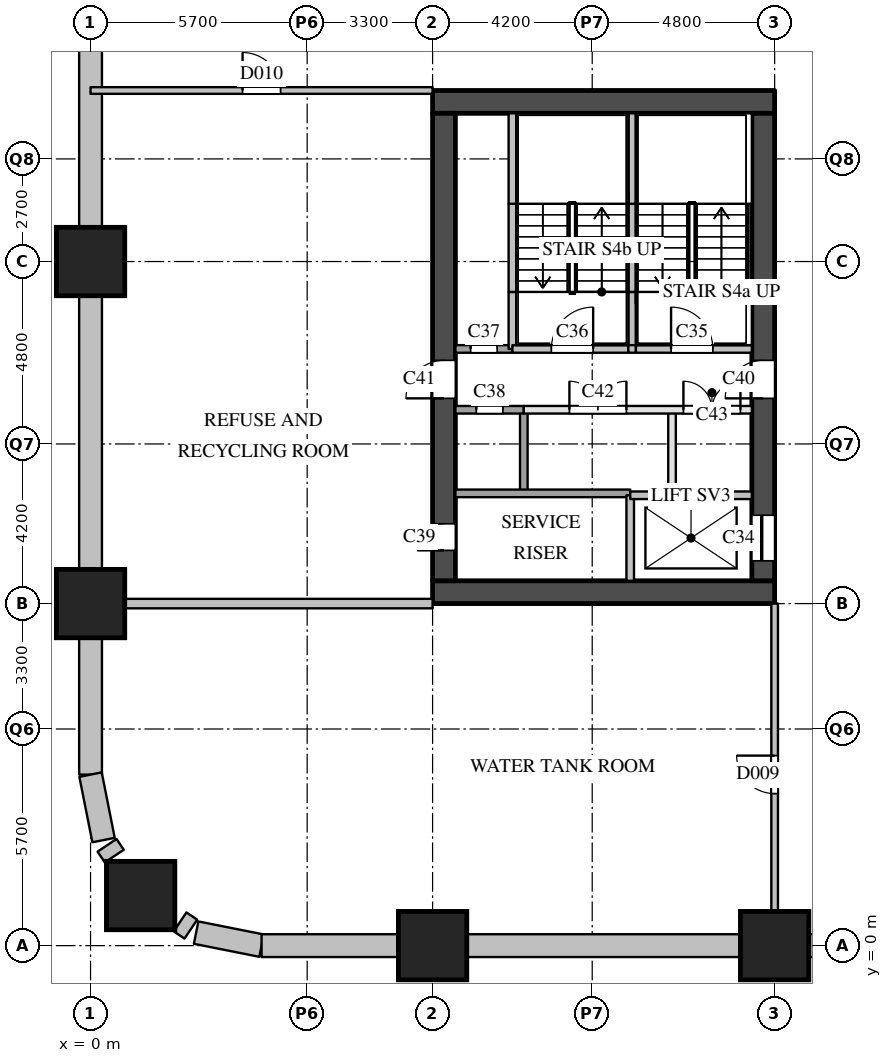
"""IFC4 building model, lengths in metres.
Left out: names, types, materials, properties, quantities, classifications, styles, units other than length and angle.
Written with IfcOpenShell. Run it as: python <this file> out.ifc"""

import sys

from ifc_helpers import new_model, si_unit, direction, frame, frame_2d, origin, origin_2d, place, context, subcontext, project, spatial, rectangle, extrude, element, fill, save


model = new_model("IFC4")
c1 = context("Model", 3, precision=1e-05, world=origin(), true_north=direction((0.0, 1.0)))
c2 = subcontext(c1, "Body", "Model", "MODEL_VIEW")
j1 = project(units=[si_unit("LENGTHUNIT", "METRE"), si_unit("PLANEANGLEUNIT", "RADIAN")], contexts=[c1])
p1 = place(None, origin())
s1 = spatial("IfcSite", under=j1, at=p1, CompositionType="ELEMENT")
p2 = place(p1, origin())
s2 = spatial("IfcBuilding", under=s1, at=p2, CompositionType="ELEMENT")
p3 = place(p2, frame((0.0, 0.0, -6.0)))
s3 = spatial("IfcBuildingStorey", under=s2, at=p3, CompositionType="ELEMENT", Elevation=-6.0)
for number, where, z_axis, x_axis in (
    (1, (1.318, 1.318, 0.0), (0.0, 0.0, 1.0), (1.0, 0.0, 0.0)),
    (2, (0.0, 9.0, 0.0), (0.0, 0.0, 1.0), (1.0, 0.0, 0.0)),
    (3, (0.0, 18.0, 0.0), (0.0, 0.0, 1.0), (1.0, 0.0, 0.0)),
    (4, (9.0, 0.0, 0.0), (0.0, 0.0, 1.0), (1.0, 0.0, 0.0)),
    (5, (18.0, 0.0, 0.0), (0.0, 0.0, 1.0), (1.0, 0.0, 0.0)),
):
    element("IfcColumn", number, at=place(p3, frame(where, z_axis=z_axis, x_axis=x_axis)), inside=s3, PredefinedType="COLUMN", context=c2, shape_type="SweptSolid", body=[
        extrude(rectangle(XDim=1.8, YDim=1.8, at=origin_2d()), origin(), (0.0, 0.0, 1.0), 6.0),
    ])
for number, where, z_axis, x_axis in (
    (6, (0.0, 26.1, 0.0), (0.0, 0.0, 1.0), (0.0, -1.0, 0.0)),
    (7, (0.0, 17.1, 0.0), (0.0, 0.0, 1.0), (0.0, -1.0, 0.0)),
):
    element("IfcWall", number, at=place(p3, frame(where, z_axis=z_axis, x_axis=x_axis)), inside=s3, PredefinedType="SOLIDWALL", context=c2, shape_type="SweptSolid", body=[
        extrude(rectangle(XDim=7.2, YDim=0.6, at=frame_2d((3.6, 0.0))), origin(), (0.0, 0.0, 1.0), 5.59),
    ])
p4 = place(p3, frame((0.0, 8.1, 0.0), z_axis=(0.0, 0.0, 1.0), x_axis=(0.0, -1.0, 0.0)))
e8 = element("IfcWall", 8, at=p4, inside=s3, PredefinedType="SOLIDWALL", context=c2, shape_type="SweptSolid", body=[
    extrude(rectangle(XDim=3.6, YDim=0.6, at=frame_2d((1.8, 0.0))), origin(), (0.0, 0.0, 1.0), 5.59),
])
p5 = place(p3, frame((0.0, 4.5, 0.0), z_axis=(0.0, 0.0, 1.0), x_axis=(0.195073223687, -0.980788681317, 0.0)))
e9 = element("IfcWall", 9, at=p5, inside=s3, PredefinedType="SOLIDWALL", context=c2, shape_type="SweptSolid", body=[
    extrude(rectangle(XDim=1.756, YDim=0.6, at=frame_2d((0.878, 0.0))), origin(), (0.0, 0.0, 1.0), 5.59),
])
for number, where, z_axis, x_axis in (
    (10, (0.435, 2.64, 0.0), (0.0, 0.0, 1.0), (0.556, -0.831, 0.0)),
    (11, (2.356, 0.625, 0.0), (0.0, 0.0, 1.0), (0.831, -0.556, 0.0)),
):
    element("IfcWall", number, at=place(p3, frame(where, z_axis=z_axis, x_axis=x_axis)), inside=s3, PredefinedType="SOLIDWALL", context=c2, shape_type="SweptSolid", body=[
        extrude(rectangle(XDim=0.342, YDim=0.6, at=frame_2d((0.171, 0.0))), origin(), (0.0, 0.0, 1.0), 5.59),
    ])
p6 = place(p3, frame((2.778, 0.343, 0.0), z_axis=(0.0, 0.0, 1.0), x_axis=(0.980788681317, -0.195073223687, 0.0)))
e12 = element("IfcWall", 12, at=p6, inside=s3, PredefinedType="SOLIDWALL", context=c2, shape_type="SweptSolid", body=[
    extrude(rectangle(XDim=1.756, YDim=0.6, at=frame_2d((0.878, 0.0))), origin(), (0.0, 0.0, 1.0), 5.59),
])
p7 = place(p3, frame((4.5, 0.0, 0.0), z_axis=(0.0, 0.0, 1.0), x_axis=(1.0, 0.0, 0.0)))
e13 = element("IfcWall", 13, at=p7, inside=s3, PredefinedType="SOLIDWALL", context=c2, shape_type="SweptSolid", body=[
    extrude(rectangle(XDim=3.6, YDim=0.6, at=frame_2d((1.8, 0.0))), origin(), (0.0, 0.0, 1.0), 5.59),
])
for number, where, z_axis, x_axis in (
    (14, (9.9, 0.0, 0.0), (0.0, 0.0, 1.0), (1.0, 0.0, 0.0)),
    (15, (18.9, 0.0, 0.0), (0.0, 0.0, 1.0), (1.0, 0.0, 0.0)),
):
    element("IfcWall", number, at=place(p3, frame(where, z_axis=z_axis, x_axis=x_axis)), inside=s3, PredefinedType="SOLIDWALL", context=c2, shape_type="SweptSolid", body=[
        extrude(rectangle(XDim=7.2, YDim=0.6, at=frame_2d((3.6, 0.0))), origin(), (0.0, 0.0, 1.0), 5.59),
    ])
for number, where, z_axis, x_axis in (
    (16, (9.0, 9.3, 0.0), (0.0, 0.0, 1.0), (1.0, 0.0, 0.0)),
    (17, (9.0, 22.2, 0.0), (0.0, 0.0, 1.0), (1.0, 0.0, 0.0)),
):
    element("IfcWall", number, at=place(p3, frame(where, z_axis=z_axis, x_axis=x_axis)), inside=s3, PredefinedType="SHEAR", context=c2, shape_type="SweptSolid", body=[
        extrude(rectangle(XDim=9.0, YDim=0.6, at=frame_2d((4.5, 0.0))), origin(), (0.0, 0.0, 1.0), 5.59),
    ])
p8 = place(p3, frame((9.3, 9.6, 0.0), z_axis=(0.0, 0.0, 1.0), x_axis=(0.0, 1.0, 0.0)))
e18 = element("IfcWall", 18, at=p8, inside=s3, PredefinedType="SHEAR", context=c2, shape_type="SweptSolid", body=[
    extrude(rectangle(XDim=12.3, YDim=0.6, at=frame_2d((6.15, 0.0))), origin(), (0.0, 0.0, 1.0), 5.59),
])
p9 = place(p8, frame((0.8, 0.0, 0.0)))
e19 = element("IfcOpeningElement", 19, at=p9, cuts=e18, PredefinedType="OPENING", context=c2, shape_type="SweptSolid", body=[
    extrude(rectangle(XDim=0.7, YDim=2.1, at=frame_2d((0.35, 1.05))), frame((0.0, 0.31, 0.0), z_axis=(0.0, -1.0, 0.0), x_axis=(1.0, 0.0, 0.0)), (0.0, 0.0, 1.0), 0.62),
])
p10 = place(p8, frame((4.8, 0.0, 0.0)))
e20 = element("IfcOpeningElement", 20, at=p10, cuts=e18, PredefinedType="OPENING", context=c2, shape_type="SweptSolid", body=[
    extrude(rectangle(XDim=1.0, YDim=2.1, at=frame_2d((0.5, 1.05))), frame((0.0, 0.31, 0.0), z_axis=(0.0, -1.0, 0.0), x_axis=(1.0, 0.0, 0.0)), (0.0, 0.0, 1.0), 0.62),
])
p11 = place(p3, frame((17.7, 9.6, 0.0), z_axis=(0.0, 0.0, 1.0), x_axis=(0.0, 1.0, 0.0)))
e21 = element("IfcWall", 21, at=p11, inside=s3, PredefinedType="SHEAR", context=c2, shape_type="SweptSolid", body=[
    extrude(rectangle(XDim=12.3, YDim=0.6, at=frame_2d((6.15, 0.0))), origin(), (0.0, 0.0, 1.0), 5.59),
])
p12 = place(p11, frame((0.525, 0.0, 0.0)))
e22 = element("IfcOpeningElement", 22, at=p12, cuts=e21, PredefinedType="OPENING", context=c2, shape_type="SweptSolid", body=[
    extrude(rectangle(XDim=1.2, YDim=2.1, at=frame_2d((0.6, 1.05))), frame((0.0, 0.31, 0.0), z_axis=(0.0, -1.0, 0.0), x_axis=(1.0, 0.0, 0.0)), (0.0, 0.0, 1.0), 0.62),
])
p13 = place(p11, frame((4.8, 0.0, 0.0)))
e23 = element("IfcOpeningElement", 23, at=p13, cuts=e21, PredefinedType="OPENING", context=c2, shape_type="SweptSolid", body=[
    extrude(rectangle(XDim=1.0, YDim=2.1, at=frame_2d((0.5, 1.05))), frame((0.0, 0.31, 0.0), z_axis=(0.0, -1.0, 0.0), x_axis=(1.0, 0.0, 0.0)), (0.0, 0.0, 1.0), 0.62),
])
p14 = place(p3, frame((11.1, 15.7, 0.0), z_axis=(0.0, 0.0, 1.0), x_axis=(0.0, 1.0, 0.0)))
e24 = element("IfcWall", 24, at=p14, inside=s3, PredefinedType="SOLIDWALL", context=c2, shape_type="SweptSolid", body=[
    extrude(rectangle(XDim=1.5, YDim=0.2, at=frame_2d((0.75, 0.0))), origin(), (0.0, 0.0, 1.0), 5.59),
])
p15 = place(p3, frame((11.1, 17.2, 0.0), z_axis=(0.0, 0.0, 1.0), x_axis=(0.0, 1.0, 0.0)))
e25 = element("IfcWall", 25, at=p15, inside=s3, PredefinedType="SOLIDWALL", context=c2, shape_type="SweptSolid", body=[
    extrude(rectangle(XDim=2.32, YDim=0.2, at=frame_2d((1.16, 0.0))), origin(), (0.0, 0.0, 1.0), 5.59),
])
p16 = place(p3, frame((11.1, 19.52, 0.0), z_axis=(0.0, 0.0, 1.0), x_axis=(0.0, 1.0, 0.0)))
e26 = element("IfcWall", 26, at=p16, inside=s3, PredefinedType="SOLIDWALL", context=c2, shape_type="SweptSolid", body=[
    extrude(rectangle(XDim=2.38, YDim=0.2, at=frame_2d((1.19, 0.0))), origin(), (0.0, 0.0, 1.0), 5.59),
])
p17 = place(p3, frame((11.4, 11.9, 0.0), z_axis=(0.0, 0.0, 1.0), x_axis=(0.0, 1.0, 0.0)))
e27 = element("IfcWall", 27, at=p17, inside=s3, PredefinedType="SOLIDWALL", context=c2, shape_type="SweptSolid", body=[
    extrude(rectangle(XDim=2.2, YDim=0.2, at=frame_2d((1.1, 0.0))), origin(), (0.0, 0.0, 1.0), 5.59),
])
p18 = place(p3, frame((14.2, 9.6, 0.0), z_axis=(0.0, 0.0, 1.0), x_axis=(0.0, 1.0, 0.0)))
e28 = element("IfcWall", 28, at=p18, inside=s3, PredefinedType="SOLIDWALL", context=c2, shape_type="SweptSolid", body=[
    extrude(rectangle(XDim=2.25, YDim=0.2, at=frame_2d((1.125, 0.0))), origin(), (0.0, 0.0, 1.0), 5.59),
])
p19 = place(p3, frame((14.2, 11.85, 0.0), z_axis=(0.0, 0.0, 1.0), x_axis=(0.0, 1.0, 0.0)))
e29 = element("IfcWall", 29, at=p19, inside=s3, PredefinedType="SOLIDWALL", context=c2, shape_type="SweptSolid", body=[
    extrude(rectangle(XDim=0.05, YDim=0.2, at=frame_2d((0.025, 0.0))), origin(), (0.0, 0.0, 1.0), 5.59),
])
p20 = place(p3, frame((14.25, 15.7, 0.0), z_axis=(0.0, 0.0, 1.0), x_axis=(0.0, 1.0, 0.0)))
e30 = element("IfcWall", 30, at=p20, inside=s3, PredefinedType="SOLIDWALL", context=c2, shape_type="SweptSolid", body=[
    extrude(rectangle(XDim=1.5, YDim=0.2, at=frame_2d((0.75, 0.0))), origin(), (0.0, 0.0, 1.0), 5.59),
])
p21 = place(p3, frame((14.25, 17.2, 0.0), z_axis=(0.0, 0.0, 1.0), x_axis=(0.0, 1.0, 0.0)))
e31 = element("IfcWall", 31, at=p21, inside=s3, PredefinedType="SOLIDWALL", context=c2, shape_type="SweptSolid", body=[
    extrude(rectangle(XDim=2.32, YDim=0.2, at=frame_2d((1.16, 0.0))), origin(), (0.0, 0.0, 1.0), 5.59),
])
p22 = place(p3, frame((14.25, 19.52, 0.0), z_axis=(0.0, 0.0, 1.0), x_axis=(0.0, 1.0, 0.0)))
e32 = element("IfcWall", 32, at=p22, inside=s3, PredefinedType="SOLIDWALL", context=c2, shape_type="SweptSolid", body=[
    extrude(rectangle(XDim=2.38, YDim=0.2, at=frame_2d((1.19, 0.0))), origin(), (0.0, 0.0, 1.0), 5.59),
])
p23 = place(p3, frame((15.3, 11.9, 0.0), z_axis=(0.0, 0.0, 1.0), x_axis=(0.0, 1.0, 0.0)))
e33 = element("IfcWall", 33, at=p23, inside=s3, PredefinedType="PARTITIONING", context=c2, shape_type="SweptSolid", body=[
    extrude(rectangle(XDim=2.2, YDim=0.2, at=frame_2d((1.1, 0.0))), origin(), (0.0, 0.0, 1.0), 5.59),
])
p24 = place(p3, frame((14.2, 11.85, 0.0), z_axis=(0.0, 0.0, 1.0), x_axis=(1.0, 0.0, 0.0)))
e34 = element("IfcWall", 34, at=p24, inside=s3, PredefinedType="SOLIDWALL", context=c2, shape_type="SweptSolid", body=[
    extrude(rectangle(XDim=3.2, YDim=0.2, at=frame_2d((1.6, 0.0))), origin(), (0.0, 0.0, 1.0), 5.59),
])
p25 = place(p3, frame((9.6, 11.9, 0.0), z_axis=(0.0, 0.0, 1.0), x_axis=(1.0, 0.0, 0.0)))
e35 = element("IfcWall", 35, at=p25, inside=s3, PredefinedType="SOLIDWALL", context=c2, shape_type="SweptSolid", body=[
    extrude(rectangle(XDim=4.6, YDim=0.2, at=frame_2d((2.3, 0.0))), origin(), (0.0, 0.0, 1.0), 5.59),
])
p26 = place(p3, frame((11.4, 14.1, 0.0), z_axis=(0.0, 0.0, 1.0), x_axis=(1.0, 0.0, 0.0)))
e36 = element("IfcWall", 36, at=p26, inside=s3, PredefinedType="PARTITIONING", context=c2, shape_type="SweptSolid", body=[
    extrude(rectangle(XDim=6.0, YDim=0.2, at=frame_2d((3.0, 0.0))), origin(), (0.0, 0.0, 1.0), 5.59),
])
p27 = place(p26, frame((1.2, 0.0, 0.0)))
e37 = element("IfcOpeningElement", 37, at=p27, cuts=e36, PredefinedType="OPENING", context=c2, shape_type="SweptSolid", body=[
    extrude(rectangle(XDim=1.5, YDim=2.1, at=frame_2d((0.75, 1.05))), frame((0.0, 0.11, 0.0), z_axis=(0.0, -1.0, 0.0), x_axis=(1.0, 0.0, 0.0)), (0.0, 0.0, 1.0), 0.22),
])
p28 = place(p26, frame((4.2, 0.0, 0.0)))
e38 = element("IfcOpeningElement", 38, at=p28, cuts=e36, PredefinedType="OPENING", context=c2, shape_type="SweptSolid", body=[
    extrude(rectangle(XDim=1.5, YDim=2.1, at=frame_2d((0.75, 1.05))), frame((0.0, 0.11, 0.0), z_axis=(0.0, -1.0, 0.0), x_axis=(1.0, 0.0, 0.0)), (0.0, 0.0, 1.0), 0.22),
])
p29 = place(p3, frame((9.6, 14.1, 0.0), z_axis=(0.0, 0.0, 1.0), x_axis=(1.0, 0.0, 0.0)))
e39 = element("IfcWall", 39, at=p29, inside=s3, PredefinedType="SOLIDWALL", context=c2, shape_type="SweptSolid", body=[
    extrude(rectangle(XDim=1.8, YDim=0.2, at=frame_2d((0.9, 0.0))), origin(), (0.0, 0.0, 1.0), 5.59),
])
p30 = place(p29, frame((0.55, 0.0, 0.0)))
e40 = element("IfcOpeningElement", 40, at=p30, cuts=e39, PredefinedType="OPENING", context=c2, shape_type="SweptSolid", body=[
    extrude(rectangle(XDim=0.7, YDim=2.1, at=frame_2d((0.35, 1.05))), frame((0.0, 0.11, 0.0), z_axis=(0.0, -1.0, 0.0), x_axis=(1.0, 0.0, 0.0)), (0.0, 0.0, 1.0), 0.22),
])
p31 = place(p3, frame((9.6, 15.7, 0.0), z_axis=(0.0, 0.0, 1.0), x_axis=(1.0, 0.0, 0.0)))
e41 = element("IfcWall", 41, at=p31, inside=s3, PredefinedType="SOLIDWALL", context=c2, shape_type="SweptSolid", body=[
    extrude(rectangle(XDim=1.5, YDim=0.2, at=frame_2d((0.75, 0.0))), origin(), (0.0, 0.0, 1.0), 5.59),
])
p32 = place(p31, frame((0.4, 0.0, 0.0)))
e42 = element("IfcOpeningElement", 42, at=p32, cuts=e41, PredefinedType="OPENING", context=c2, shape_type="SweptSolid", body=[
    extrude(rectangle(XDim=0.7, YDim=2.1, at=frame_2d((0.35, 1.05))), frame((0.0, 0.11, 0.0), z_axis=(0.0, -1.0, 0.0), x_axis=(1.0, 0.0, 0.0)), (0.0, 0.0, 1.0), 0.22),
])
p33 = place(p3, frame((11.1, 15.7, 0.0), z_axis=(0.0, 0.0, 1.0), x_axis=(1.0, 0.0, 0.0)))
e43 = element("IfcWall", 43, at=p33, inside=s3, PredefinedType="SOLIDWALL", context=c2, shape_type="SweptSolid", body=[
    extrude(rectangle(XDim=3.05, YDim=0.2, at=frame_2d((1.525, 0.0))), origin(), (0.0, 0.0, 1.0), 5.59),
])
p34 = place(p33, frame((1.025, 0.0, 0.0)))
e44 = element("IfcOpeningElement", 44, at=p34, cuts=e43, PredefinedType="OPENING", context=c2, shape_type="SweptSolid", body=[
    extrude(rectangle(XDim=1.1, YDim=2.1, at=frame_2d((0.55, 1.05))), frame((0.0, 0.11, 0.0), z_axis=(0.0, -1.0, 0.0), x_axis=(1.0, 0.0, 0.0)), (0.0, 0.0, 1.0), 0.22),
])
p35 = place(p3, frame((14.15, 15.7, 0.0), z_axis=(0.0, 0.0, 1.0), x_axis=(1.0, 0.0, 0.0)))
e45 = element("IfcWall", 45, at=p35, inside=s3, PredefinedType="SOLIDWALL", context=c2, shape_type="SweptSolid", body=[
    extrude(rectangle(XDim=0.2, YDim=0.2, at=frame_2d((0.1, 0.0))), origin(), (0.0, 0.0, 1.0), 5.59),
])
p36 = place(p3, frame((14.35, 15.7, 0.0), z_axis=(0.0, 0.0, 1.0), x_axis=(1.0, 0.0, 0.0)))
e46 = element("IfcWall", 46, at=p36, inside=s3, PredefinedType="SOLIDWALL", context=c2, shape_type="SweptSolid", body=[
    extrude(rectangle(XDim=3.05, YDim=0.2, at=frame_2d((1.525, 0.0))), origin(), (0.0, 0.0, 1.0), 5.59),
])
p37 = place(p36, frame((0.925, 0.0, 0.0)))
e47 = element("IfcOpeningElement", 47, at=p37, cuts=e46, PredefinedType="OPENING", context=c2, shape_type="SweptSolid", body=[
    extrude(rectangle(XDim=1.1, YDim=2.1, at=frame_2d((0.55, 1.05))), frame((0.0, 0.11, 0.0), z_axis=(0.0, -1.0, 0.0), x_axis=(1.0, 0.0, 0.0)), (0.0, 0.0, 1.0), 0.22),
])
p38 = place(p3, frame((0.0, 22.5, 0.0), z_axis=(0.0, 0.0, 1.0), x_axis=(1.0, 0.0, 0.0)))
e48 = element("IfcWall", 48, at=p38, inside=s3, PredefinedType="PARTITIONING", context=c2, shape_type="SweptSolid", body=[
    extrude(rectangle(XDim=9.0, YDim=0.175, at=frame_2d((4.5, 0.0))), origin(), (0.0, 0.0, 1.0), 5.59),
])
p39 = place(p38, frame((4.0, 0.0, 0.0)))
e49 = element("IfcOpeningElement", 49, at=p39, cuts=e48, PredefinedType="OPENING", context=c2, shape_type="SweptSolid", body=[
    extrude(rectangle(XDim=1.0, YDim=2.1, at=frame_2d((0.5, 1.05))), frame((0.0, 0.097, 0.0), z_axis=(0.0, -1.0, 0.0), x_axis=(1.0, 0.0, 0.0)), (0.0, 0.0, 1.0), 0.195),
])
p40 = place(p3, frame((18.0, 0.0, 0.0), z_axis=(0.0, 0.0, 1.0), x_axis=(0.0, 1.0, 0.0)))
e50 = element("IfcWall", 50, at=p40, inside=s3, PredefinedType="PARTITIONING", context=c2, shape_type="SweptSolid", body=[
    extrude(rectangle(XDim=9.0, YDim=0.175, at=frame_2d((4.5, 0.0))), origin(), (0.0, 0.0, 1.0), 5.59),
])
p41 = place(p40, frame((4.0, 0.0, 0.0)))
e51 = element("IfcOpeningElement", 51, at=p41, cuts=e50, PredefinedType="OPENING", context=c2, shape_type="SweptSolid", body=[
    extrude(rectangle(XDim=1.0, YDim=2.1, at=frame_2d((0.5, 1.05))), frame((0.0, 0.097, 0.0), z_axis=(0.0, -1.0, 0.0), x_axis=(1.0, 0.0, 0.0)), (0.0, 0.0, 1.0), 0.195),
])
p42 = place(p3, frame((0.0, 9.0, 0.0), z_axis=(0.0, 0.0, 1.0), x_axis=(1.0, 0.0, 0.0)))
e52 = element("IfcWall", 52, at=p42, inside=s3, PredefinedType="PARTITIONING", context=c2, shape_type="SweptSolid", body=[
    extrude(rectangle(XDim=9.0, YDim=0.25, at=frame_2d((4.5, 0.0))), origin(), (0.0, 0.0, 1.0), 5.59),
])
p43 = place(p12, origin())
e53 = element("IfcDoor", 53, at=p43, inside=s3, OperationType="SLIDING_TO_LEFT", PredefinedType="DOOR", context=c2, shape_type="SweptSolid", body=[
    extrude(rectangle(XDim=1.2, YDim=2.1, at=frame_2d((0.6, 1.05))), frame((0.0, 0.025, 0.0), z_axis=(0.0, -1.0, 0.0), x_axis=(1.0, 0.0, 0.0)), (0.0, 0.0, 1.0), 0.05),
])
fill(e22, e53)
p44 = place(p37, origin())
e54 = element("IfcDoor", 54, at=p44, inside=s3, OperationType="SINGLE_SWING_LEFT", PredefinedType="DOOR", context=c2, shape_type="SweptSolid", body=[
    extrude(rectangle(XDim=1.1, YDim=2.1, at=frame_2d((0.55, 1.05))), frame((0.0, 0.025, 0.0), z_axis=(0.0, -1.0, 0.0), x_axis=(1.0, 0.0, 0.0)), (0.0, 0.0, 1.0), 0.05),
])
fill(e47, e54)
p45 = place(p34, origin())
e55 = element("IfcDoor", 55, at=p45, inside=s3, OperationType="SINGLE_SWING_RIGHT", PredefinedType="DOOR", context=c2, shape_type="SweptSolid", body=[
    extrude(rectangle(XDim=1.1, YDim=2.1, at=frame_2d((0.55, 1.05))), frame((0.0, 0.025, 0.0), z_axis=(0.0, -1.0, 0.0), x_axis=(1.0, 0.0, 0.0)), (0.0, 0.0, 1.0), 0.05),
])
fill(e44, e55)
p46 = place(p32, origin())
e56 = element("IfcDoor", 56, at=p46, inside=s3, OperationType="SINGLE_SWING_LEFT", PredefinedType="DOOR", context=c2, shape_type="SweptSolid", body=[
    extrude(rectangle(XDim=0.7, YDim=2.1, at=frame_2d((0.35, 1.05))), frame((0.0, 0.025, 0.0), z_axis=(0.0, -1.0, 0.0), x_axis=(1.0, 0.0, 0.0)), (0.0, 0.0, 1.0), 0.05),
])
fill(e42, e56)
p47 = place(p30, origin())
e57 = element("IfcDoor", 57, at=p47, inside=s3, OperationType="SINGLE_SWING_LEFT", PredefinedType="DOOR", context=c2, shape_type="SweptSolid", body=[
    extrude(rectangle(XDim=0.7, YDim=2.1, at=frame_2d((0.35, 1.05))), frame((0.0, 0.025, 0.0), z_axis=(0.0, -1.0, 0.0), x_axis=(1.0, 0.0, 0.0)), (0.0, 0.0, 1.0), 0.05),
])
fill(e40, e57)
p48 = place(p9, origin())
e58 = element("IfcDoor", 58, at=p48, inside=s3, OperationType="SINGLE_SWING_LEFT", PredefinedType="DOOR", context=c2, shape_type="SweptSolid", body=[
    extrude(rectangle(XDim=0.7, YDim=2.1, at=frame_2d((0.35, 1.05))), frame((0.0, 0.025, 0.0), z_axis=(0.0, -1.0, 0.0), x_axis=(1.0, 0.0, 0.0)), (0.0, 0.0, 1.0), 0.05),
])
fill(e19, e58)
p49 = place(p13, origin())
e59 = element("IfcDoor", 59, at=p49, inside=s3, OperationType="SINGLE_SWING_LEFT", PredefinedType="DOOR", context=c2, shape_type="SweptSolid", body=[
    extrude(rectangle(XDim=1.0, YDim=2.1, at=frame_2d((0.5, 1.05))), frame((0.0, 0.025, 0.0), z_axis=(0.0, -1.0, 0.0), x_axis=(1.0, 0.0, 0.0)), (0.0, 0.0, 1.0), 0.05),
])
fill(e23, e59)
p50 = place(p10, origin())
e60 = element("IfcDoor", 60, at=p50, inside=s3, OperationType="SINGLE_SWING_LEFT", PredefinedType="DOOR", context=c2, shape_type="SweptSolid", body=[
    extrude(rectangle(XDim=1.0, YDim=2.1, at=frame_2d((0.5, 1.05))), frame((0.0, 0.025, 0.0), z_axis=(0.0, -1.0, 0.0), x_axis=(1.0, 0.0, 0.0)), (0.0, 0.0, 1.0), 0.05),
])
fill(e20, e60)
p51 = place(p27, origin())
e61 = element("IfcDoor", 61, at=p51, inside=s3, OperationType="DOUBLE_DOOR_SINGLE_SWING", PredefinedType="DOOR", context=c2, shape_type="SweptSolid", body=[
    extrude(rectangle(XDim=1.5, YDim=2.1, at=frame_2d((0.75, 1.05))), frame((0.0, 0.025, 0.0), z_axis=(0.0, -1.0, 0.0), x_axis=(1.0, 0.0, 0.0)), (0.0, 0.0, 1.0), 0.05),
])
fill(e37, e61)
p52 = place(p28, origin())
e62 = element("IfcDoor", 62, at=p52, inside=s3, OperationType="DOUBLE_DOOR_SINGLE_SWING", PredefinedType="DOOR", context=c2, shape_type="SweptSolid", body=[
    extrude(rectangle(XDim=1.5, YDim=2.1, at=frame_2d((0.75, 1.05))), frame((0.0, 0.025, 0.0), z_axis=(0.0, -1.0, 0.0), x_axis=(1.0, 0.0, 0.0)), (0.0, 0.0, 1.0), 0.05),
])
fill(e38, e62)
p53 = place(p41, origin())
e63 = element("IfcDoor", 63, at=p53, inside=s3, OperationType="SINGLE_SWING_RIGHT", PredefinedType="DOOR", context=c2, shape_type="SweptSolid", body=[
    extrude(rectangle(XDim=1.0, YDim=2.1, at=frame_2d((0.5, 1.05))), frame((0.0, 0.025, 0.0), z_axis=(0.0, -1.0, 0.0), x_axis=(1.0, 0.0, 0.0)), (0.0, 0.0, 1.0), 0.05),
])
fill(e51, e63)
p54 = place(p39, origin())
e64 = element("IfcDoor", 64, at=p54, inside=s3, OperationType="SINGLE_SWING_LEFT", PredefinedType="DOOR", context=c2, shape_type="SweptSolid", body=[
    extrude(rectangle(XDim=1.0, YDim=2.1, at=frame_2d((0.5, 1.05))), frame((0.0, 0.025, 0.0), z_axis=(0.0, -1.0, 0.0), x_axis=(1.0, 0.0, 0.0)), (0.0, 0.0, 1.0), 0.05),
])
fill(e49, e64)
save(model, sys.argv[1])
